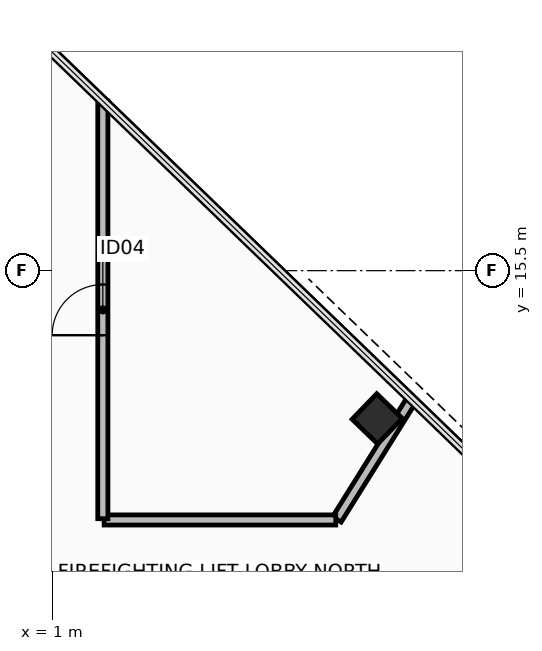
"""IFC4 building model, lengths in metres.
Left out: names, types, materials, properties, quantities, classifications, styles, units other than length and angle.
Written with IfcOpenShell. Run it as: python <this file> out.ifc"""

import sys

from ifc_helpers import new_model, si_unit, direction, frame, frame_2d, origin, origin_2d, place, context, subcontext, project, spatial, rectangle, hollow_rectangle, extrude, element, fill, save


model = new_model("IFC4")
c1 = context("Model", 3, precision=1e-05, world=origin(), true_north=direction((0.0, 1.0)))
c2 = subcontext(c1, "Body", "Model", "MODEL_VIEW")
j1 = project(units=[si_unit("LENGTHUNIT", "METRE"), si_unit("PLANEANGLEUNIT", "RADIAN")], contexts=[c1])
p1 = place(None, origin())
s1 = spatial("IfcSite", under=j1, at=p1, CompositionType="ELEMENT")
p2 = place(p1, origin())
s2 = spatial("IfcBuilding", under=s1, at=p2, CompositionType="ELEMENT")
p3 = place(p2, frame((0.0, 0.0, 93.3)))
s3 = spatial("IfcBuildingStorey", under=s2, at=p3, CompositionType="ELEMENT", Elevation=93.3)
p4 = place(p3, frame((7.415, 12.576, 0.0), z_axis=(0.0, 0.0, 1.0), x_axis=(-0.719339800339, 0.694658370459, 0.0)))
e1 = element("IfcColumn", 1, at=p4, inside=s3, PredefinedType="COLUMN", context=c2, shape_type="SweptSolid", body=[
    extrude(hollow_rectangle(XDim=0.7, YDim=0.7, WallThickness=0.04, at=origin_2d()), origin(), (0.0, 0.0, 1.0), 3.6),
])
p5 = place(p3, frame((8.087, 12.942, 0.0), z_axis=(0.0, 0.0, 1.0), x_axis=(-0.529919746943, -0.848047794526, 0.0)))
e2 = element("IfcWall", 2, at=p5, inside=s3, PredefinedType="PARTITIONING", context=c2, shape_type="SweptSolid", body=[
    extrude(rectangle(XDim=2.771, YDim=0.2, at=frame_2d((1.386, 0.0))), origin(), (0.0, 0.0, 1.0), 2.605),
])
p6 = place(p3, frame((6.597, 10.58, 0.0), z_axis=(0.0, 0.0, 1.0), x_axis=(-1.0, 0.0, 0.0)))
e3 = element("IfcWall", 3, at=p6, inside=s3, PredefinedType="PARTITIONING", context=c2, shape_type="SweptSolid", body=[
    extrude(rectangle(XDim=4.573, YDim=0.2, at=frame_2d((2.286, 0.0))), origin(), (0.0, 0.0, 1.0), 3.005),
])
p7 = place(p3, frame((2.0, 10.605, 0.0), z_axis=(0.0, 0.0, 1.0), x_axis=(0.0, 1.0, 0.0)))
e4 = element("IfcWall", 4, at=p7, inside=s3, PredefinedType="PARTITIONING", context=c2, shape_type="SweptSolid", body=[
    extrude(rectangle(XDim=8.242, YDim=0.2, at=frame_2d((4.121, 0.0))), origin(), (0.0, 0.0, 1.0), 2.605),
])
p8 = place(p7, frame((3.621, 0.0, 0.0)))
e5 = element("IfcOpeningElement", 5, at=p8, cuts=e4, PredefinedType="OPENING", context=c2, shape_type="SweptSolid", body=[
    extrude(rectangle(XDim=1.0, YDim=2.15, at=frame_2d((0.5, 1.075))), frame((0.0, 0.11, 0.0), z_axis=(0.0, -1.0, 0.0), x_axis=(1.0, 0.0, 0.0)), (0.0, 0.0, 1.0), 0.22),
])
p9 = place(p8, origin())
e6 = element("IfcDoor", 6, at=p9, inside=s3, OperationType="SINGLE_SWING_RIGHT", PredefinedType="DOOR", context=c2, shape_type="SweptSolid", body=[
    extrude(rectangle(XDim=1.0, YDim=2.15, at=frame_2d((0.5, 1.075))), frame((0.0, 0.025, 0.0), z_axis=(0.0, -1.0, 0.0), x_axis=(1.0, 0.0, 0.0)), (0.0, 0.0, 1.0), 0.05),
])
fill(e5, e6)
save(model, sys.argv[1])
